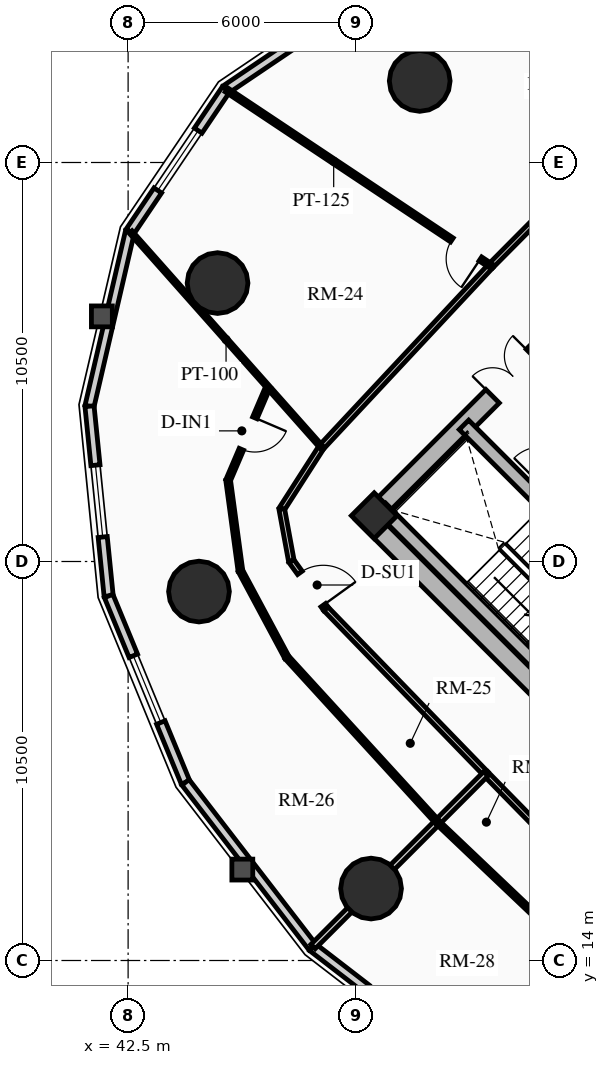
"""IFC4 building model, lengths in metres.
Left out: names, types, materials, properties, quantities, classifications, styles, units other than length and angle.
Written with IfcOpenShell. Run it as: python <this file> out.ifc"""

import sys

from ifc_helpers import new_model, si_unit, direction, frame, frame_2d, origin, origin_2d, place, context, subcontext, project, spatial, rectangle, circle, extrude, source, transform, mapped, element, fill, save


model = new_model("IFC4")
c1 = context("Model", 3, precision=1e-05, world=origin(), true_north=direction((0.0, 1.0)))
c2 = subcontext(c1, "Body", "Model", "MODEL_VIEW")
j1 = project(units=[si_unit("LENGTHUNIT", "METRE"), si_unit("PLANEANGLEUNIT", "RADIAN")], contexts=[c1])
p1 = place(None, origin())
s1 = spatial("IfcSite", under=j1, at=p1, CompositionType="ELEMENT")
p2 = place(p1, origin())
s2 = spatial("IfcBuilding", under=s1, at=p2, CompositionType="ELEMENT")
p3 = place(p2, frame((0.0, 0.0, 24.91)))
s3 = spatial("IfcBuildingStorey", under=s2, at=p3, CompositionType="ELEMENT", Elevation=24.91)
p4 = place(p3, frame((58.773, 15.661, 0.0), z_axis=(0.0, 0.0, 1.0), x_axis=(-0.707106781187, 0.707106781187, 0.0)))
e1 = element("IfcWall", 1, at=p4, inside=s3, PredefinedType="SHEAR", context=c2, shape_type="SweptSolid", body=[
    extrude(rectangle(XDim=14.3, YDim=0.5, at=frame_2d((7.15, 0.0))), origin(), (0.0, 0.0, 1.0), 2.91),
])
p5 = place(p3, frame((48.838, 25.596, 0.0), z_axis=(0.0, 0.0, 1.0), x_axis=(0.707106781187, 0.707106781187, 0.0)))
e2 = element("IfcWall", 2, at=p5, inside=s3, PredefinedType="SHEAR", context=c2, shape_type="SweptSolid", body=[
    extrude(rectangle(XDim=10.7, YDim=0.5, at=frame_2d((5.35, 0.0))), origin(), (0.0, 0.0, 1.0), 2.91),
])
m1 = source(origin(), c2, "Body", "SweptSolid", [
    extrude(rectangle(XDim=1.5, YDim=2.02, at=frame_2d((0.75, 1.01))), frame((0.0, 0.26, 0.0), z_axis=(0.0, -1.0, 0.0), x_axis=(1.0, 0.0, 0.0)), (0.0, 0.0, 1.0), 0.52),
])
p6 = place(p5, frame((4.6, 0.0, 0.0)))
e3 = element("IfcOpeningElement", 3, at=p6, cuts=e2, PredefinedType="OPENING", context=c2, shape_type="MappedRepresentation", body=[
    mapped(m1, transform((0.0, 0.0, 0.0), x_axis=(1.0, 0.0, 0.0), y_axis=(0.0, 1.0, 0.0), z_axis=(0.0, 0.0, 1.0), scale=1.0)),
])
p7 = place(p3, frame((61.096, 18.338, 0.0), z_axis=(0.0, 0.0, 1.0), x_axis=(-0.707106781187, 0.707106781187, 0.0)))
e4 = element("IfcWall", 4, at=p7, inside=s3, PredefinedType="SHEAR", context=c2, shape_type="SweptSolid", body=[
    extrude(rectangle(XDim=13.8, YDim=0.35, at=frame_2d((6.9, 0.0))), origin(), (0.0, 0.0, 1.0), 2.91),
])
m2 = source(origin(), c2, "Body", "SweptSolid", [
    extrude(rectangle(XDim=1.1, YDim=2.015, at=frame_2d((0.55, 1.007))), frame((0.0, 0.185, 0.0), z_axis=(0.0, -1.0, 0.0), x_axis=(1.0, 0.0, 0.0)), (0.0, 0.0, 1.0), 0.37),
])
p8 = place(p7, frame((4.9, 0.0, 0.0)))
e5 = element("IfcOpeningElement", 5, at=p8, cuts=e4, PredefinedType="OPENING", context=c2, shape_type="MappedRepresentation", body=[
    mapped(m2, transform((0.0, 0.0, 0.0), x_axis=(1.0, 0.0, 0.0), y_axis=(0.0, 1.0, 0.0), z_axis=(0.0, 0.0, 1.0), scale=1.0)),
])
m3 = source(origin(), c2, "Body", "SweptSolid", [
    extrude(rectangle(XDim=1.15, YDim=2.02, at=frame_2d((0.575, 1.01))), frame((0.0, 0.185, 0.0), z_axis=(0.0, -1.0, 0.0), x_axis=(1.0, 0.0, 0.0)), (0.0, 0.0, 1.0), 0.37),
])
p9 = place(p7, frame((7.32, 0.0, 0.0)))
e6 = element("IfcOpeningElement", 6, at=p9, cuts=e4, PredefinedType="OPENING", context=c2, shape_type="MappedRepresentation", body=[
    mapped(m3, transform((0.0, 0.0, 0.0), x_axis=(1.0, 0.0, 0.0), y_axis=(0.0, 1.0, 0.0), z_axis=(0.0, 0.0, 1.0), scale=1.0)),
])
p10 = place(p3, frame((53.922, 21.141, 0.0), z_axis=(0.0, 0.0, 1.0), x_axis=(-0.707106781187, 0.707106781187, 0.0)))
e7 = element("IfcWall", 7, at=p10, inside=s3, PredefinedType="SHEAR", context=c2, shape_type="SweptSolid", body=[
    extrude(rectangle(XDim=6.745, YDim=0.35, at=frame_2d((3.373, 0.0))), origin(), (0.0, 0.0, 1.0), 2.91),
])
p11 = place(p3, frame((48.976, 25.706, 0.0), z_axis=(0.0, 0.0, 1.0), x_axis=(0.707106781187, 0.707106781187, 0.0)))
e8 = element("IfcColumn", 8, at=p11, inside=s3, PredefinedType="COLUMN", context=c2, shape_type="SweptSolid", body=[
    extrude(rectangle(XDim=0.85, YDim=0.85, at=origin_2d()), origin(), (0.0, 0.0, 1.0), 2.91),
])
for number, where, z_axis, x_axis in (
    (9, (50.173, 37.146, 0.0), (0.0, 0.0, 1.0), (1.0, 0.0, 0.0)),
    (10, (44.854, 31.827, 0.0), (0.0, 0.0, 1.0), (1.0, 0.0, 0.0)),
    (11, (44.365, 23.709, 0.0), (0.0, 0.0, 1.0), (1.0, 0.0, 0.0)),
    (12, (48.893, 15.893, 0.0), (0.0, 0.0, 1.0), (1.0, 0.0, 0.0)),
):
    element("IfcColumn", number, at=place(p3, frame(where, z_axis=z_axis, x_axis=x_axis)), inside=s3, PredefinedType="USERDEFINED", context=c2, shape_type="SweptSolid", body=[
        extrude(circle(Radius=0.8, at=origin_2d()), origin(), (0.0, 0.0, 1.0), 2.91),
    ])
p12 = place(p3, frame((45.076, 36.924, 0.0), z_axis=(0.0, 0.0, 1.0), x_axis=(0.828776615238, 0.559579594012, 0.0)))
e13 = element("IfcWall", 13, at=p12, inside=s3, PredefinedType="SOLIDWALL", context=c2, shape_type="SweptSolid", body=[
    extrude(rectangle(XDim=4.517, YDim=0.24, at=frame_2d((2.259, 0.0))), origin(), (0.0, 0.0, 1.0), 2.073),
])
p13 = place(p3, frame((42.548, 33.18, 0.0), z_axis=(0.0, 0.0, 1.0), x_axis=(0.559579594012, 0.828776615238, 0.0)))
e14 = element("IfcWall", 14, at=p13, inside=s3, PredefinedType="SOLIDWALL", context=c2, shape_type="SweptSolid", body=[
    extrude(rectangle(XDim=4.517, YDim=0.24, at=frame_2d((2.259, 0.0))), origin(), (0.0, 0.0, 1.0), 2.073),
])
m4 = source(origin(), c2, "Body", "SweptSolid", [
    extrude(rectangle(XDim=1.9, YDim=1.35, at=frame_2d((0.95, 0.675))), frame((0.0, 0.13, 0.0), z_axis=(0.0, -1.0, 0.0), x_axis=(1.0, 0.0, 0.0)), (0.0, 0.0, 1.0), 0.26),
])
p14 = place(p13, frame((1.309, 0.0, 0.65)))
e15 = element("IfcOpeningElement", 15, at=p14, cuts=e14, PredefinedType="OPENING", context=c2, shape_type="MappedRepresentation", body=[
    mapped(m4, transform((0.0, 0.0, 0.0), x_axis=(1.0, 0.0, 0.0), y_axis=(0.0, 1.0, 0.0), z_axis=(0.0, 0.0, 1.0), scale=1.0)),
])
p15 = place(p3, frame((41.484, 28.586, 0.0), z_axis=(0.0, 0.0, 1.0), x_axis=(0.225698919833, 0.974197104074, 0.0)))
e16 = element("IfcWall", 16, at=p15, inside=s3, PredefinedType="SOLIDWALL", context=c2, shape_type="SweptSolid", body=[
    extrude(rectangle(XDim=4.715, YDim=0.24, at=frame_2d((2.357, 0.0))), origin(), (0.0, 0.0, 1.0), 2.073),
])
p16 = place(p3, frame((41.988, 23.593, 0.0), z_axis=(0.0, 0.0, 1.0), x_axis=(-0.100356187272, 0.994951574538, 0.0)))
e17 = element("IfcWall", 17, at=p16, inside=s3, PredefinedType="SOLIDWALL", context=c2, shape_type="SweptSolid", body=[
    extrude(rectangle(XDim=5.019, YDim=0.24, at=frame_2d((2.509, 0.0))), origin(), (0.0, 0.0, 1.0), 2.073),
])
p17 = place(p16, frame((1.559, 0.0, 0.65)))
e18 = element("IfcOpeningElement", 18, at=p17, cuts=e17, PredefinedType="OPENING", context=c2, shape_type="MappedRepresentation", body=[
    mapped(m4, transform((0.0, 0.0, 0.0), x_axis=(1.0, 0.0, 0.0), y_axis=(0.0, 1.0, 0.0), z_axis=(0.0, 0.0, 1.0), scale=1.0)),
])
p18 = place(p3, frame((44.01, 18.688, 0.0), z_axis=(0.0, 0.0, 1.0), x_axis=(-0.381113147118, 0.924528403616, 0.0)))
e19 = element("IfcWall", 19, at=p18, inside=s3, PredefinedType="SOLIDWALL", context=c2, shape_type="SweptSolid", body=[
    extrude(rectangle(XDim=5.305, YDim=0.24, at=frame_2d((2.653, 0.0))), origin(), (0.0, 0.0, 1.0), 2.073),
])
p19 = place(p18, frame((1.703, 0.0, 0.65)))
e20 = element("IfcOpeningElement", 20, at=p19, cuts=e19, PredefinedType="OPENING", context=c2, shape_type="MappedRepresentation", body=[
    mapped(m4, transform((0.0, 0.0, 0.0), x_axis=(1.0, 0.0, 0.0), y_axis=(0.0, 1.0, 0.0), z_axis=(0.0, 0.0, 1.0), scale=1.0)),
])
p20 = place(p3, frame((47.352, 14.352, 0.0), z_axis=(0.0, 0.0, 1.0), x_axis=(-0.610557396243, 0.791972010801, 0.0)))
e21 = element("IfcWall", 21, at=p20, inside=s3, PredefinedType="SOLIDWALL", context=c2, shape_type="SweptSolid", body=[
    extrude(rectangle(XDim=5.475, YDim=0.24, at=frame_2d((2.737, 0.0))), origin(), (0.0, 0.0, 1.0), 2.073),
])
p21 = place(p3, frame((51.688, 11.01, 0.0), z_axis=(0.0, 0.0, 1.0), x_axis=(-0.791972010801, 0.610557396243, 0.0)))
e22 = element("IfcWall", 22, at=p21, inside=s3, PredefinedType="SOLIDWALL", context=c2, shape_type="SweptSolid", body=[
    extrude(rectangle(XDim=5.475, YDim=0.24, at=frame_2d((2.737, 0.0))), origin(), (0.0, 0.0, 1.0), 2.073),
])
p22 = place(p21, frame((1.787, 0.0, 0.65)))
e23 = element("IfcOpeningElement", 23, at=p22, cuts=e22, PredefinedType="OPENING", context=c2, shape_type="MappedRepresentation", body=[
    mapped(m4, transform((0.0, 0.0, 0.0), x_axis=(1.0, 0.0, 0.0), y_axis=(0.0, 1.0, 0.0), z_axis=(0.0, 0.0, 1.0), scale=1.0)),
])
p23 = place(p3, frame((54.427, 34.683, 0.0), z_axis=(0.0, 0.0, 1.0), x_axis=(-0.704178989986, -0.710022499687, 0.0)))
e24 = element("IfcWall", 24, at=p23, inside=s3, PredefinedType="PARTITIONING", context=c2, shape_type="SweptSolid", body=[
    extrude(rectangle(XDim=3.384, YDim=0.15, at=frame_2d((1.692, 0.0))), origin(), (0.0, 0.0, 1.0), 2.159),
])
p24 = place(p3, frame((52.043, 32.28, 0.0), z_axis=(0.0, 0.0, 1.0), x_axis=(-0.682606081633, -0.730786519661, 0.0)))
e25 = element("IfcWall", 25, at=p24, inside=s3, PredefinedType="PARTITIONING", context=c2, shape_type="SweptSolid", body=[
    extrude(rectangle(XDim=6.527, YDim=0.15, at=frame_2d((3.263, 0.0))), origin(), (0.0, 0.0, 1.0), 2.159),
])
p25 = place(p3, frame((47.588, 27.51, 0.0), z_axis=(0.0, 0.0, 1.0), x_axis=(-0.540202619347, -0.841534984449, 0.0)))
e26 = element("IfcWall", 26, at=p25, inside=s3, PredefinedType="PARTITIONING", context=c2, shape_type="SweptSolid", body=[
    extrude(rectangle(XDim=1.935, YDim=0.15, at=frame_2d((0.967, 0.0))), origin(), (0.0, 0.0, 1.0), 2.159),
])
p26 = place(p3, frame((46.543, 25.882, 0.0), z_axis=(0.0, 0.0, 1.0), x_axis=(0.181153502579, -0.983454832976, 0.0)))
e27 = element("IfcWall", 27, at=p26, inside=s3, PredefinedType="PARTITIONING", context=c2, shape_type="SweptSolid", body=[
    extrude(rectangle(XDim=1.392, YDim=0.15, at=frame_2d((0.696, 0.0))), origin(), (0.0, 0.0, 1.0), 2.159),
])
p27 = place(p3, frame((46.795, 24.513, 0.0), z_axis=(0.0, 0.0, 1.0), x_axis=(0.585628197524, -0.810579801294, 0.0)))
e28 = element("IfcWall", 28, at=p27, inside=s3, PredefinedType="PARTITIONING", context=c2, shape_type="SweptSolid", body=[
    extrude(rectangle(XDim=1.554, YDim=0.15, at=frame_2d((0.777, 0.0))), origin(), (0.0, 0.0, 1.0), 2.205),
])
m5 = source(origin(), c2, "Body", "SweptSolid", [
    extrude(rectangle(XDim=1.05, YDim=2.015, at=frame_2d((0.525, 1.007))), frame((0.0, 0.085, 0.0), z_axis=(0.0, -1.0, 0.0), x_axis=(1.0, 0.0, 0.0)), (0.0, 0.0, 1.0), 0.17),
])
p28 = place(p27, frame((0.384, 0.0, 0.0)))
e29 = element("IfcOpeningElement", 29, at=p28, cuts=e28, PredefinedType="OPENING", context=c2, shape_type="MappedRepresentation", body=[
    mapped(m5, transform((0.0, 0.0, 0.0), x_axis=(1.0, 0.0, 0.0), y_axis=(0.0, 1.0, 0.0), z_axis=(0.0, 0.0, 1.0), scale=1.0)),
])
p29 = place(p3, frame((47.706, 23.253, 0.0), z_axis=(0.0, 0.0, 1.0), x_axis=(0.696179266346, -0.717867974707, 0.0)))
e30 = element("IfcWall", 30, at=p29, inside=s3, PredefinedType="PARTITIONING", context=c2, shape_type="SweptSolid", body=[
    extrude(rectangle(XDim=6.045, YDim=0.15, at=frame_2d((3.022, 0.0))), origin(), (0.0, 0.0, 1.0), 2.635),
])
p30 = place(p3, frame((51.914, 18.914, 0.0), z_axis=(0.0, 0.0, 1.0), x_axis=(0.699999313799, -0.714143515465, 0.0)))
e31 = element("IfcWall", 31, at=p30, inside=s3, PredefinedType="PARTITIONING", context=c2, shape_type="SweptSolid", body=[
    extrude(rectangle(XDim=6.162, YDim=0.15, at=frame_2d((3.081, 0.0))), origin(), (0.0, 0.0, 1.0), 2.159),
])
p31 = place(p3, frame((47.588, 27.51, 0.0), z_axis=(0.0, 0.0, 1.0), x_axis=(-0.663646630644, 0.74804622159, 0.0)))
e32 = element("IfcWall", 32, at=p31, inside=s3, PredefinedType="MOVABLE", context=c2, shape_type="SweptSolid", body=[
    extrude(rectangle(XDim=7.567, YDim=0.1, at=frame_2d((3.784, 0.0))), origin(), (0.0, 0.0, 1.0), 2.073),
])
p32 = place(p3, frame((51.914, 18.914, 0.0), z_axis=(0.0, 0.0, 1.0), x_axis=(-0.707106781187, -0.707106781187, 0.0)))
e33 = element("IfcWall", 33, at=p32, inside=s3, PredefinedType="PARTITIONING", context=c2, shape_type="SweptSolid", body=[
    extrude(rectangle(XDim=6.431, YDim=0.16, at=frame_2d((3.215, 0.0))), origin(), (0.0, 0.0, 1.0), 2.073),
])
p33 = place(p3, frame((52.043, 32.28, 0.0), z_axis=(0.0, 0.0, 1.0), x_axis=(-0.832355916658, 0.554241488887, 0.0)))
e34 = element("IfcWall", 34, at=p33, inside=s3, PredefinedType="PARTITIONING", context=c2, shape_type="SweptSolid", body=[
    extrude(rectangle(XDim=8.354, YDim=0.125, at=frame_2d((4.177, 0.0))), origin(), (0.0, 0.0, 1.0), 2.073),
])
m6 = source(origin(), c2, "Body", "SweptSolid", [
    extrude(rectangle(XDim=0.9, YDim=2.005, at=frame_2d((0.45, 1.002))), frame((0.0, 0.073, 0.0), z_axis=(0.0, -1.0, 0.0), x_axis=(1.0, 0.0, 0.0)), (0.0, 0.0, 1.0), 0.145),
])
p34 = place(p33, frame((0.33, 0.0, 0.0)))
e35 = element("IfcOpeningElement", 35, at=p34, cuts=e34, PredefinedType="OPENING", context=c2, shape_type="MappedRepresentation", body=[
    mapped(m6, transform((0.0, 0.0, 0.0), x_axis=(1.0, 0.0, 0.0), y_axis=(0.0, 1.0, 0.0), z_axis=(0.0, 0.0, 1.0), scale=1.0)),
])
p35 = place(p3, frame((46.182, 29.095, 0.0), z_axis=(0.0, 0.0, 1.0), x_axis=(-0.39298176502, -0.919546264394, 0.0)))
e36 = element("IfcWall", 36, at=p35, inside=s3, PredefinedType="PARTITIONING", context=c2, shape_type="SweptSolid", body=[
    extrude(rectangle(XDim=2.672, YDim=0.125, at=frame_2d((1.336, 0.0))), origin(), (0.0, 0.0, 1.0), 2.205),
])
p36 = place(p35, frame((0.886, 0.0, 0.0)))
e37 = element("IfcOpeningElement", 37, at=p36, cuts=e36, PredefinedType="OPENING", context=c2, shape_type="MappedRepresentation", body=[
    mapped(m6, transform((0.0, 0.0, 0.0), x_axis=(1.0, 0.0, 0.0), y_axis=(0.0, 1.0, 0.0), z_axis=(0.0, 0.0, 1.0), scale=1.0)),
])
p37 = place(p3, frame((45.132, 26.638, 0.0), z_axis=(0.0, 0.0, 1.0), x_axis=(0.134279147929, -0.990943545532, 0.0)))
e38 = element("IfcWall", 38, at=p37, inside=s3, PredefinedType="PARTITIONING", context=c2, shape_type="SweptSolid", body=[
    extrude(rectangle(XDim=2.404, YDim=0.125, at=frame_2d((1.202, 0.0))), origin(), (0.0, 0.0, 1.0), 2.159),
])
p38 = place(p3, frame((45.455, 24.256, 0.0), z_axis=(0.0, 0.0, 1.0), x_axis=(0.472268582458, -0.881454698792, 0.0)))
e39 = element("IfcWall", 39, at=p38, inside=s3, PredefinedType="PARTITIONING", context=c2, shape_type="SweptSolid", body=[
    extrude(rectangle(XDim=2.585, YDim=0.125, at=frame_2d((1.292, 0.0))), origin(), (0.0, 0.0, 1.0), 2.159),
])
p39 = place(p3, frame((46.676, 21.978, 0.0), z_axis=(0.0, 0.0, 1.0), x_axis=(0.67473816271, -0.738057187339, 0.0)))
e40 = element("IfcWall", 40, at=p39, inside=s3, PredefinedType="PARTITIONING", context=c2, shape_type="SweptSolid", body=[
    extrude(rectangle(XDim=5.876, YDim=0.125, at=frame_2d((2.938, 0.0))), origin(), (0.0, 0.0, 1.0), 2.635),
])
p40 = place(p3, frame((50.641, 17.641, 0.0), z_axis=(0.0, 0.0, 1.0), x_axis=(0.724909383019, -0.688844239586, 0.0)))
e41 = element("IfcWall", 41, at=p40, inside=s3, PredefinedType="PARTITIONING", context=c2, shape_type="SweptSolid", body=[
    extrude(rectangle(XDim=5.957, YDim=0.125, at=frame_2d((2.979, 0.0))), origin(), (0.0, 0.0, 1.0), 2.159),
])
m7 = source(origin(), c2, "Body", "SweptSolid", [
    extrude(rectangle(XDim=1.9, YDim=1.35, at=frame_2d((0.95, 0.675))), frame((0.0, 0.03, 0.0), z_axis=(0.0, -1.0, 0.0), x_axis=(1.0, 0.0, 0.0)), (0.0, 0.0, 1.0), 0.06),
])
p41 = place(p14, origin())
e42 = element("IfcWindow", 42, at=p41, inside=s3, PartitioningType="DOUBLE_PANEL_VERTICAL", PredefinedType="WINDOW", context=c2, shape_type="MappedRepresentation", body=[
    mapped(m7, transform((0.0, 0.0, 0.0), x_axis=(1.0, 0.0, 0.0), y_axis=(0.0, 1.0, 0.0), z_axis=(0.0, 0.0, 1.0), scale=1.0)),
])
fill(e15, e42)
p42 = place(p17, origin())
e43 = element("IfcWindow", 43, at=p42, inside=s3, PartitioningType="DOUBLE_PANEL_VERTICAL", PredefinedType="WINDOW", context=c2, shape_type="MappedRepresentation", body=[
    mapped(m7, transform((0.0, 0.0, 0.0), x_axis=(1.0, 0.0, 0.0), y_axis=(0.0, 1.0, 0.0), z_axis=(0.0, 0.0, 1.0), scale=1.0)),
])
fill(e18, e43)
p43 = place(p19, origin())
e44 = element("IfcWindow", 44, at=p43, inside=s3, PartitioningType="DOUBLE_PANEL_VERTICAL", PredefinedType="WINDOW", context=c2, shape_type="MappedRepresentation", body=[
    mapped(m7, transform((0.0, 0.0, 0.0), x_axis=(1.0, 0.0, 0.0), y_axis=(0.0, 1.0, 0.0), z_axis=(0.0, 0.0, 1.0), scale=1.0)),
])
fill(e20, e44)
m8 = source(origin(), c2, "Body", "SweptSolid", [
    extrude(rectangle(XDim=1.5, YDim=2.02, at=frame_2d((0.75, 1.01))), frame((0.0, 0.025, 0.0), z_axis=(0.0, -1.0, 0.0), x_axis=(1.0, 0.0, 0.0)), (0.0, 0.0, 1.0), 0.05),
])
p44 = place(p6, origin())
e45 = element("IfcDoor", 45, at=p44, inside=s3, OperationType="DOUBLE_DOOR_SINGLE_SWING", PredefinedType="DOOR", context=c2, shape_type="MappedRepresentation", body=[
    mapped(m8, transform((0.0, 0.0, 0.0), x_axis=(1.0, 0.0, 0.0), y_axis=(0.0, 1.0, 0.0), z_axis=(0.0, 0.0, 1.0), scale=1.0)),
])
fill(e3, e45)
m9 = source(origin(), c2, "Body", "SweptSolid", [
    extrude(rectangle(XDim=0.9, YDim=2.005, at=frame_2d((0.45, 1.002))), frame((0.0, 0.025, 0.0), z_axis=(0.0, -1.0, 0.0), x_axis=(1.0, 0.0, 0.0)), (0.0, 0.0, 1.0), 0.05),
])
p45 = place(p34, origin())
e46 = element("IfcDoor", 46, at=p45, inside=s3, OperationType="SINGLE_SWING_LEFT", PredefinedType="DOOR", context=c2, shape_type="MappedRepresentation", body=[
    mapped(m9, transform((0.0, 0.0, 0.0), x_axis=(1.0, 0.0, 0.0), y_axis=(0.0, 1.0, 0.0), z_axis=(0.0, 0.0, 1.0), scale=1.0)),
])
fill(e35, e46)
m10 = source(origin(), c2, "Body", "SweptSolid", [
    extrude(rectangle(XDim=1.05, YDim=2.015, at=frame_2d((0.525, 1.007))), frame((0.0, 0.025, 0.0), z_axis=(0.0, -1.0, 0.0), x_axis=(1.0, 0.0, 0.0)), (0.0, 0.0, 1.0), 0.05),
])
p46 = place(p28, origin())
e47 = element("IfcDoor", 47, at=p46, inside=s3, OperationType="SINGLE_SWING_RIGHT", PredefinedType="DOOR", context=c2, shape_type="MappedRepresentation", body=[
    mapped(m10, transform((0.0, 0.0, 0.0), x_axis=(1.0, 0.0, 0.0), y_axis=(0.0, 1.0, 0.0), z_axis=(0.0, 0.0, 1.0), scale=1.0)),
])
fill(e29, e47)
p47 = place(p36, origin())
e48 = element("IfcDoor", 48, at=p47, inside=s3, OperationType="SINGLE_SWING_LEFT", PredefinedType="DOOR", context=c2, shape_type="MappedRepresentation", body=[
    mapped(m9, transform((0.0, 0.0, 0.0), x_axis=(1.0, 0.0, 0.0), y_axis=(0.0, 1.0, 0.0), z_axis=(0.0, 0.0, 1.0), scale=1.0)),
])
fill(e37, e48)
save(model, sys.argv[1])
